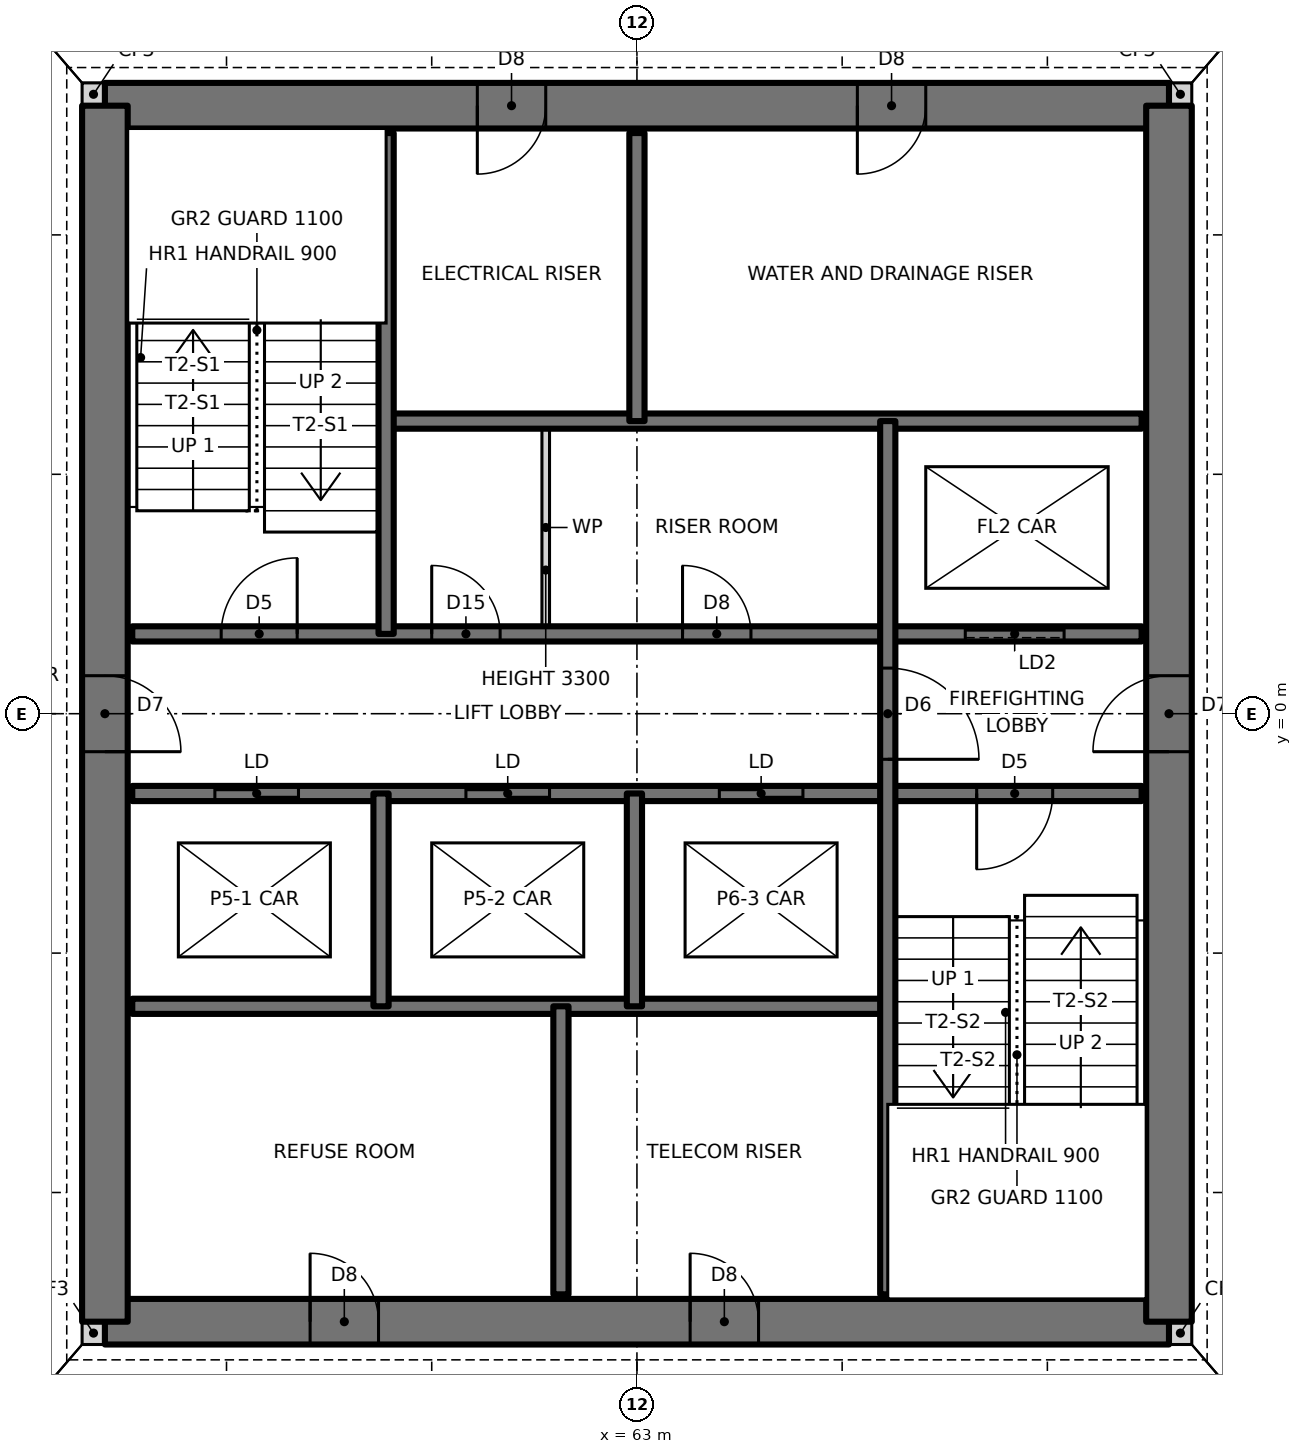
"""IFC4 building model, lengths in metres.
Left out: names, types, materials, properties, quantities, classifications, styles, units other than length and angle.
Written with IfcOpenShell. Run it as: python <this file> out.ifc"""

import sys

from ifc_helpers import new_model, si_unit, direction, frame, frame_2d, origin, place, context, subcontext, project, spatial, rectangle, extrude, element, fill, save


model = new_model("IFC4")
c1 = context("Model", 3, precision=1e-05, world=origin(), true_north=direction((0.0, 1.0)))
c2 = subcontext(c1, "Body", "Model", "MODEL_VIEW")
j1 = project(units=[si_unit("LENGTHUNIT", "METRE"), si_unit("PLANEANGLEUNIT", "RADIAN")], contexts=[c1])
p1 = place(None, origin())
s1 = spatial("IfcSite", under=j1, at=p1, CompositionType="ELEMENT")
p2 = place(p1, origin())
s2 = spatial("IfcBuilding", under=s1, at=p2, CompositionType="ELEMENT")
p3 = place(p2, frame((0.0, 0.0, 32.5)))
s3 = spatial("IfcBuildingStorey", under=s2, at=p3, CompositionType="ELEMENT", Elevation=32.5)
for number, where, z_axis, x_axis in (
    (1, (55.7, -8.15, 0.0), (0.0, 0.0, 1.0), (1.0, 0.0, 0.0)),
    (2, (70.0, -8.15, 0.0), (0.0, 0.0, 1.0), (1.0, 0.0, 0.0)),
    (3, (70.0, 8.15, 0.0), (0.0, 0.0, 1.0), (1.0, 0.0, 0.0)),
    (4, (55.7, 8.15, 0.0), (0.0, 0.0, 1.0), (1.0, 0.0, 0.0)),
):
    element("IfcWall", number, at=place(p3, frame(where, z_axis=z_axis, x_axis=x_axis)), inside=s3, PredefinedType="SOLIDWALL", context=c2, shape_type="SweptSolid", body=[
        extrude(rectangle(XDim=0.3, YDim=0.3, at=frame_2d((0.15, 0.0))), origin(), (0.0, 0.0, 1.0), 3.5),
    ])
p4 = place(p3, frame((56.0, -8.0, 0.0), z_axis=(0.0, 0.0, 1.0), x_axis=(1.0, 0.0, 0.0)))
e5 = element("IfcWall", 5, at=p4, inside=s3, PredefinedType="SHEAR", context=c2, shape_type="SweptSolid", body=[
    extrude(rectangle(XDim=14.0, YDim=0.6, at=frame_2d((7.0, 0.0))), origin(), (0.0, 0.0, 1.0), 3.5),
])
p5 = place(p4, frame((2.7, 0.0, 0.0)))
e6 = element("IfcOpeningElement", 6, at=p5, cuts=e5, PredefinedType="OPENING", context=c2, shape_type="SweptSolid", body=[
    extrude(rectangle(XDim=0.9, YDim=2.1, at=frame_2d((0.45, 1.05))), frame((0.0, 0.31, 0.0), z_axis=(0.0, -1.0, 0.0), x_axis=(1.0, 0.0, 0.0)), (0.0, 0.0, 1.0), 0.62),
])
p6 = place(p4, frame((7.7, 0.0, 0.0)))
e7 = element("IfcOpeningElement", 7, at=p6, cuts=e5, PredefinedType="OPENING", context=c2, shape_type="SweptSolid", body=[
    extrude(rectangle(XDim=0.9, YDim=2.1, at=frame_2d((0.45, 1.05))), frame((0.0, 0.31, 0.0), z_axis=(0.0, -1.0, 0.0), x_axis=(1.0, 0.0, 0.0)), (0.0, 0.0, 1.0), 0.62),
])
p7 = place(p3, frame((70.0, 8.0, 0.0), z_axis=(0.0, 0.0, 1.0), x_axis=(-1.0, 0.0, 0.0)))
e8 = element("IfcWall", 8, at=p7, inside=s3, PredefinedType="SHEAR", context=c2, shape_type="SweptSolid", body=[
    extrude(rectangle(XDim=14.0, YDim=0.6, at=frame_2d((7.0, 0.0))), origin(), (0.0, 0.0, 1.0), 3.5),
])
p8 = place(p7, frame((8.2, 0.0, 0.0)))
e9 = element("IfcOpeningElement", 9, at=p8, cuts=e8, PredefinedType="OPENING", context=c2, shape_type="SweptSolid", body=[
    extrude(rectangle(XDim=0.9, YDim=2.1, at=frame_2d((0.45, 1.05))), frame((0.0, 0.31, 0.0), z_axis=(0.0, -1.0, 0.0), x_axis=(1.0, 0.0, 0.0)), (0.0, 0.0, 1.0), 0.62),
])
p9 = place(p7, frame((3.2, 0.0, 0.0)))
e10 = element("IfcOpeningElement", 10, at=p9, cuts=e8, PredefinedType="OPENING", context=c2, shape_type="SweptSolid", body=[
    extrude(rectangle(XDim=0.9, YDim=2.1, at=frame_2d((0.45, 1.05))), frame((0.0, 0.31, 0.0), z_axis=(0.0, -1.0, 0.0), x_axis=(1.0, 0.0, 0.0)), (0.0, 0.0, 1.0), 0.62),
])
p10 = place(p3, frame((70.0, -8.0, 0.0), z_axis=(0.0, 0.0, 1.0), x_axis=(0.0, 1.0, 0.0)))
e11 = element("IfcWall", 11, at=p10, inside=s3, PredefinedType="SHEAR", context=c2, shape_type="SweptSolid", body=[
    extrude(rectangle(XDim=16.0, YDim=0.6, at=frame_2d((8.0, 0.0))), origin(), (0.0, 0.0, 1.0), 3.5),
])
p11 = place(p10, frame((7.5, 0.0, 0.0)))
e12 = element("IfcOpeningElement", 12, at=p11, cuts=e11, PredefinedType="OPENING", context=c2, shape_type="SweptSolid", body=[
    extrude(rectangle(XDim=1.0, YDim=2.1, at=frame_2d((0.5, 1.05))), frame((0.0, 0.31, 0.0), z_axis=(0.0, -1.0, 0.0), x_axis=(1.0, 0.0, 0.0)), (0.0, 0.0, 1.0), 0.62),
])
p12 = place(p3, frame((56.0, 8.0, 0.0), z_axis=(0.0, 0.0, 1.0), x_axis=(0.0, -1.0, 0.0)))
e13 = element("IfcWall", 13, at=p12, inside=s3, PredefinedType="SHEAR", context=c2, shape_type="SweptSolid", body=[
    extrude(rectangle(XDim=16.0, YDim=0.6, at=frame_2d((8.0, 0.0))), origin(), (0.0, 0.0, 1.0), 3.5),
])
p13 = place(p12, frame((7.5, 0.0, 0.0)))
e14 = element("IfcOpeningElement", 14, at=p13, cuts=e13, PredefinedType="OPENING", context=c2, shape_type="SweptSolid", body=[
    extrude(rectangle(XDim=1.0, YDim=2.1, at=frame_2d((0.5, 1.05))), frame((0.0, 0.31, 0.0), z_axis=(0.0, -1.0, 0.0), x_axis=(1.0, 0.0, 0.0)), (0.0, 0.0, 1.0), 0.62),
])
p14 = place(p3, frame((56.36, -3.85, 0.0), z_axis=(0.0, 0.0, 1.0), x_axis=(1.0, 0.0, 0.0)))
e15 = element("IfcWall", 15, at=p14, inside=s3, PredefinedType="SOLIDWALL", context=c2, shape_type="SweptSolid", body=[
    extrude(rectangle(XDim=9.94, YDim=0.2, at=frame_2d((4.97, 0.0))), origin(), (0.0, 0.0, 1.0), 3.5),
])
p15 = place(p3, frame((56.36, -1.05, 0.0), z_axis=(0.0, 0.0, 1.0), x_axis=(1.0, 0.0, 0.0)))
e16 = element("IfcWall", 16, at=p15, inside=s3, PredefinedType="SOLIDWALL", context=c2, shape_type="SweptSolid", body=[
    extrude(rectangle(XDim=13.28, YDim=0.2, at=frame_2d((6.64, 0.0))), origin(), (0.0, 0.0, 1.0), 3.5),
])
p16 = place(p15, frame((11.11, 0.0, 0.0)))
e17 = element("IfcOpeningElement", 17, at=p16, cuts=e16, PredefinedType="OPENING", context=c2, shape_type="SweptSolid", body=[
    extrude(rectangle(XDim=1.0, YDim=2.1, at=frame_2d((0.5, 1.05))), frame((0.0, 0.11, 0.0), z_axis=(0.0, -1.0, 0.0), x_axis=(1.0, 0.0, 0.0)), (0.0, 0.0, 1.0), 0.22),
])
p17 = place(p15, frame((1.087, 0.0, 0.0)))
e18 = element("IfcOpeningElement", 18, at=p17, cuts=e16, PredefinedType="OPENING", context=c2, shape_type="SweptSolid", body=[
    extrude(rectangle(XDim=1.1, YDim=2.1, at=frame_2d((0.55, 1.05))), frame((0.0, 0.11, 0.0), z_axis=(0.0, -1.0, 0.0), x_axis=(1.0, 0.0, 0.0)), (0.0, 0.0, 1.0), 0.22),
])
p18 = place(p15, frame((4.39, 0.0, 0.0)))
e19 = element("IfcOpeningElement", 19, at=p18, cuts=e16, PredefinedType="OPENING", context=c2, shape_type="SweptSolid", body=[
    extrude(rectangle(XDim=1.1, YDim=2.1, at=frame_2d((0.55, 1.05))), frame((0.0, 0.11, 0.0), z_axis=(0.0, -1.0, 0.0), x_axis=(1.0, 0.0, 0.0)), (0.0, 0.0, 1.0), 0.22),
])
p19 = place(p15, frame((7.724, 0.0, 0.0)))
e20 = element("IfcOpeningElement", 20, at=p19, cuts=e16, PredefinedType="OPENING", context=c2, shape_type="SweptSolid", body=[
    extrude(rectangle(XDim=1.1, YDim=2.1, at=frame_2d((0.55, 1.05))), frame((0.0, 0.11, 0.0), z_axis=(0.0, -1.0, 0.0), x_axis=(1.0, 0.0, 0.0)), (0.0, 0.0, 1.0), 0.22),
])
p20 = place(p3, frame((56.36, 1.05, 0.0), z_axis=(0.0, 0.0, 1.0), x_axis=(1.0, 0.0, 0.0)))
e21 = element("IfcWall", 21, at=p20, inside=s3, PredefinedType="SOLIDWALL", context=c2, shape_type="SweptSolid", body=[
    extrude(rectangle(XDim=13.28, YDim=0.2, at=frame_2d((6.64, 0.0))), origin(), (0.0, 0.0, 1.0), 3.5),
])
p21 = place(p20, frame((1.17, 0.0, 0.0)))
e22 = element("IfcOpeningElement", 22, at=p21, cuts=e21, PredefinedType="OPENING", context=c2, shape_type="SweptSolid", body=[
    extrude(rectangle(XDim=1.0, YDim=2.1, at=frame_2d((0.5, 1.05))), frame((0.0, 0.11, 0.0), z_axis=(0.0, -1.0, 0.0), x_axis=(1.0, 0.0, 0.0)), (0.0, 0.0, 1.0), 0.22),
])
p22 = place(p20, frame((7.24, 0.0, 0.0)))
e23 = element("IfcOpeningElement", 23, at=p22, cuts=e21, PredefinedType="OPENING", context=c2, shape_type="SweptSolid", body=[
    extrude(rectangle(XDim=0.9, YDim=2.1, at=frame_2d((0.45, 1.05))), frame((0.0, 0.11, 0.0), z_axis=(0.0, -1.0, 0.0), x_axis=(1.0, 0.0, 0.0)), (0.0, 0.0, 1.0), 0.22),
])
p23 = place(p20, frame((3.94, 0.0, 0.0)))
e24 = element("IfcOpeningElement", 24, at=p23, cuts=e21, PredefinedType="OPENING", context=c2, shape_type="SweptSolid", body=[
    extrude(rectangle(XDim=0.9, YDim=2.1, at=frame_2d((0.45, 1.05))), frame((0.0, 0.11, 0.0), z_axis=(0.0, -1.0, 0.0), x_axis=(1.0, 0.0, 0.0)), (0.0, 0.0, 1.0), 0.22),
])
p24 = place(p20, frame((10.96, 0.0, 0.0)))
e25 = element("IfcOpeningElement", 25, at=p24, cuts=e21, PredefinedType="OPENING", context=c2, shape_type="SweptSolid", body=[
    extrude(rectangle(XDim=1.3, YDim=2.1, at=frame_2d((0.65, 1.05))), frame((0.0, 0.11, 0.0), z_axis=(0.0, -1.0, 0.0), x_axis=(1.0, 0.0, 0.0)), (0.0, 0.0, 1.0), 0.22),
])
p25 = place(p3, frame((59.7, 3.85, 0.0), z_axis=(0.0, 0.0, 1.0), x_axis=(1.0, 0.0, 0.0)))
e26 = element("IfcWall", 26, at=p25, inside=s3, PredefinedType="SOLIDWALL", context=c2, shape_type="SweptSolid", body=[
    extrude(rectangle(XDim=9.94, YDim=0.2, at=frame_2d((4.97, 0.0))), origin(), (0.0, 0.0, 1.0), 3.5),
])
p26 = place(p3, frame((66.3, -7.64, 0.0), z_axis=(0.0, 0.0, 1.0), x_axis=(0.0, 1.0, 0.0)))
e27 = element("IfcWall", 27, at=p26, inside=s3, PredefinedType="SOLIDWALL", context=c2, shape_type="SweptSolid", body=[
    extrude(rectangle(XDim=11.49, YDim=0.2, at=frame_2d((5.745, 0.0))), origin(), (0.0, 0.0, 1.0), 3.5),
])
p27 = place(p26, frame((7.04, 0.0, 0.0)))
e28 = element("IfcOpeningElement", 28, at=p27, cuts=e27, PredefinedType="OPENING", context=c2, shape_type="SweptSolid", body=[
    extrude(rectangle(XDim=1.2, YDim=2.1, at=frame_2d((0.6, 1.05))), frame((0.0, 0.11, 0.0), z_axis=(0.0, -1.0, 0.0), x_axis=(1.0, 0.0, 0.0)), (0.0, 0.0, 1.0), 0.22),
])
p28 = place(p3, frame((63.0, 3.85, 0.0), z_axis=(0.0, 0.0, 1.0), x_axis=(0.0, 1.0, 0.0)))
e29 = element("IfcWall", 29, at=p28, inside=s3, PredefinedType="SOLIDWALL", context=c2, shape_type="SweptSolid", body=[
    extrude(rectangle(XDim=3.79, YDim=0.2, at=frame_2d((1.895, 0.0))), origin(), (0.0, 0.0, 1.0), 3.5),
])
p29 = place(p3, frame((62.967, -3.85, 0.0), z_axis=(0.0, 0.0, 1.0), x_axis=(0.0, 1.0, 0.0)))
e30 = element("IfcWall", 30, at=p29, inside=s3, PredefinedType="SOLIDWALL", context=c2, shape_type="SweptSolid", body=[
    extrude(rectangle(XDim=2.8, YDim=0.2, at=frame_2d((1.4, 0.0))), origin(), (0.0, 0.0, 1.0), 3.5),
])
p30 = place(p3, frame((62.0, -7.64, 0.0), z_axis=(0.0, 0.0, 1.0), x_axis=(0.0, 1.0, 0.0)))
e31 = element("IfcWall", 31, at=p30, inside=s3, PredefinedType="SOLIDWALL", context=c2, shape_type="SweptSolid", body=[
    extrude(rectangle(XDim=3.79, YDim=0.2, at=frame_2d((1.895, 0.0))), origin(), (0.0, 0.0, 1.0), 3.5),
])
p31 = place(p3, frame((61.8, 1.05, 0.0), z_axis=(0.0, 0.0, 1.0), x_axis=(0.0, 1.0, 0.0)))
e32 = element("IfcWall", 32, at=p31, inside=s3, PredefinedType="PARTITIONING", context=c2, shape_type="SweptSolid", body=[
    extrude(rectangle(XDim=2.8, YDim=0.1, at=frame_2d((1.4, 0.0))), origin(), (0.0, 0.0, 1.0), 3.3),
])
p32 = place(p3, frame((59.7, 1.05, 0.0), z_axis=(0.0, 0.0, 1.0), x_axis=(0.0, 1.0, 0.0)))
e33 = element("IfcWall", 33, at=p32, inside=s3, PredefinedType="SOLIDWALL", context=c2, shape_type="SweptSolid", body=[
    extrude(rectangle(XDim=6.59, YDim=0.2, at=frame_2d((3.295, 0.0))), origin(), (0.0, 0.0, 1.0), 3.5),
])
p33 = place(p3, frame((59.633, -3.85, 0.0), z_axis=(0.0, 0.0, 1.0), x_axis=(0.0, 1.0, 0.0)))
e34 = element("IfcWall", 34, at=p33, inside=s3, PredefinedType="SOLIDWALL", context=c2, shape_type="SweptSolid", body=[
    extrude(rectangle(XDim=2.8, YDim=0.2, at=frame_2d((1.4, 0.0))), origin(), (0.0, 0.0, 1.0), 3.5),
])
p34 = place(p21, origin())
e35 = element("IfcDoor", 35, at=p34, inside=s3, OperationType="SINGLE_SWING_RIGHT", PredefinedType="DOOR", context=c2, shape_type="SweptSolid", body=[
    extrude(rectangle(XDim=1.0, YDim=2.1, at=frame_2d((0.5, 1.05))), frame((0.0, 0.025, 0.0), z_axis=(0.0, -1.0, 0.0), x_axis=(1.0, 0.0, 0.0)), (0.0, 0.0, 1.0), 0.05),
])
fill(e22, e35)
p35 = place(p16, frame((1.0, 0.0, 0.0), z_axis=(0.0, 0.0, 1.0), x_axis=(-1.0, 0.0, 0.0)))
e36 = element("IfcDoor", 36, at=p35, inside=s3, OperationType="SINGLE_SWING_RIGHT", PredefinedType="DOOR", context=c2, shape_type="SweptSolid", body=[
    extrude(rectangle(XDim=1.0, YDim=2.1, at=frame_2d((0.5, 1.05))), frame((0.0, 0.025, 0.0), z_axis=(0.0, -1.0, 0.0), x_axis=(1.0, 0.0, 0.0)), (0.0, 0.0, 1.0), 0.05),
])
fill(e17, e36)
p36 = place(p27, frame((1.2, 0.0, 0.0), z_axis=(0.0, 0.0, 1.0), x_axis=(-1.0, 0.0, 0.0)))
e37 = element("IfcDoor", 37, at=p36, inside=s3, OperationType="SINGLE_SWING_RIGHT", PredefinedType="DOOR", context=c2, shape_type="SweptSolid", body=[
    extrude(rectangle(XDim=1.2, YDim=2.1, at=frame_2d((0.6, 1.05))), frame((0.0, 0.025, 0.0), z_axis=(0.0, -1.0, 0.0), x_axis=(1.0, 0.0, 0.0)), (0.0, 0.0, 1.0), 0.05),
])
fill(e28, e37)
p37 = place(p22, origin())
e38 = element("IfcDoor", 38, at=p37, inside=s3, OperationType="SINGLE_SWING_LEFT", PredefinedType="DOOR", context=c2, shape_type="SweptSolid", body=[
    extrude(rectangle(XDim=0.9, YDim=2.1, at=frame_2d((0.45, 1.05))), frame((0.0, 0.025, 0.0), z_axis=(0.0, -1.0, 0.0), x_axis=(1.0, 0.0, 0.0)), (0.0, 0.0, 1.0), 0.05),
])
fill(e23, e38)
p38 = place(p23, origin())
e39 = element("IfcDoor", 39, at=p38, inside=s3, OperationType="SINGLE_SWING_LEFT", PredefinedType="DOOR", context=c2, shape_type="SweptSolid", body=[
    extrude(rectangle(XDim=0.9, YDim=2.1, at=frame_2d((0.45, 1.05))), frame((0.0, 0.025, 0.0), z_axis=(0.0, -1.0, 0.0), x_axis=(1.0, 0.0, 0.0)), (0.0, 0.0, 1.0), 0.05),
])
fill(e24, e39)
p39 = place(p13, origin())
e40 = element("IfcDoor", 40, at=p39, inside=s3, OperationType="SINGLE_SWING_RIGHT", PredefinedType="DOOR", context=c2, shape_type="SweptSolid", body=[
    extrude(rectangle(XDim=1.0, YDim=2.1, at=frame_2d((0.5, 1.05))), frame((0.0, 0.025, 0.0), z_axis=(0.0, -1.0, 0.0), x_axis=(1.0, 0.0, 0.0)), (0.0, 0.0, 1.0), 0.05),
])
fill(e14, e40)
p40 = place(p11, origin())
e41 = element("IfcDoor", 41, at=p40, inside=s3, OperationType="SINGLE_SWING_LEFT", PredefinedType="DOOR", context=c2, shape_type="SweptSolid", body=[
    extrude(rectangle(XDim=1.0, YDim=2.1, at=frame_2d((0.5, 1.05))), frame((0.0, 0.025, 0.0), z_axis=(0.0, -1.0, 0.0), x_axis=(1.0, 0.0, 0.0)), (0.0, 0.0, 1.0), 0.05),
])
fill(e12, e41)
p41 = place(p8, origin())
e42 = element("IfcDoor", 42, at=p41, inside=s3, OperationType="SINGLE_SWING_RIGHT", PredefinedType="DOOR", context=c2, shape_type="SweptSolid", body=[
    extrude(rectangle(XDim=0.9, YDim=2.1, at=frame_2d((0.45, 1.05))), frame((0.0, 0.025, 0.0), z_axis=(0.0, -1.0, 0.0), x_axis=(1.0, 0.0, 0.0)), (0.0, 0.0, 1.0), 0.05),
])
fill(e9, e42)
p42 = place(p9, origin())
e43 = element("IfcDoor", 43, at=p42, inside=s3, OperationType="SINGLE_SWING_RIGHT", PredefinedType="DOOR", context=c2, shape_type="SweptSolid", body=[
    extrude(rectangle(XDim=0.9, YDim=2.1, at=frame_2d((0.45, 1.05))), frame((0.0, 0.025, 0.0), z_axis=(0.0, -1.0, 0.0), x_axis=(1.0, 0.0, 0.0)), (0.0, 0.0, 1.0), 0.05),
])
fill(e10, e43)
p43 = place(p5, origin())
e44 = element("IfcDoor", 44, at=p43, inside=s3, OperationType="SINGLE_SWING_LEFT", PredefinedType="DOOR", context=c2, shape_type="SweptSolid", body=[
    extrude(rectangle(XDim=0.9, YDim=2.1, at=frame_2d((0.45, 1.05))), frame((0.0, 0.025, 0.0), z_axis=(0.0, -1.0, 0.0), x_axis=(1.0, 0.0, 0.0)), (0.0, 0.0, 1.0), 0.05),
])
fill(e6, e44)
p44 = place(p6, origin())
e45 = element("IfcDoor", 45, at=p44, inside=s3, OperationType="SINGLE_SWING_LEFT", PredefinedType="DOOR", context=c2, shape_type="SweptSolid", body=[
    extrude(rectangle(XDim=0.9, YDim=2.1, at=frame_2d((0.45, 1.05))), frame((0.0, 0.025, 0.0), z_axis=(0.0, -1.0, 0.0), x_axis=(1.0, 0.0, 0.0)), (0.0, 0.0, 1.0), 0.05),
])
fill(e7, e45)
p45 = place(p17, origin())
e46 = element("IfcDoor", 46, at=p45, inside=s3, OperationType="DOUBLE_DOOR_SLIDING", PredefinedType="DOOR", context=c2, shape_type="SweptSolid", body=[
    extrude(rectangle(XDim=1.1, YDim=2.1, at=frame_2d((0.55, 1.05))), frame((0.0, 0.025, 0.0), z_axis=(0.0, -1.0, 0.0), x_axis=(1.0, 0.0, 0.0)), (0.0, 0.0, 1.0), 0.05),
])
fill(e18, e46)
p46 = place(p18, origin())
e47 = element("IfcDoor", 47, at=p46, inside=s3, OperationType="DOUBLE_DOOR_SLIDING", PredefinedType="DOOR", context=c2, shape_type="SweptSolid", body=[
    extrude(rectangle(XDim=1.1, YDim=2.1, at=frame_2d((0.55, 1.05))), frame((0.0, 0.025, 0.0), z_axis=(0.0, -1.0, 0.0), x_axis=(1.0, 0.0, 0.0)), (0.0, 0.0, 1.0), 0.05),
])
fill(e19, e47)
p47 = place(p19, origin())
e48 = element("IfcDoor", 48, at=p47, inside=s3, OperationType="DOUBLE_DOOR_SLIDING", PredefinedType="DOOR", context=c2, shape_type="SweptSolid", body=[
    extrude(rectangle(XDim=1.1, YDim=2.1, at=frame_2d((0.55, 1.05))), frame((0.0, 0.025, 0.0), z_axis=(0.0, -1.0, 0.0), x_axis=(1.0, 0.0, 0.0)), (0.0, 0.0, 1.0), 0.05),
])
fill(e20, e48)
p48 = place(p24, origin())
e49 = element("IfcDoor", 49, at=p48, inside=s3, OperationType="SLIDING_TO_LEFT", PredefinedType="DOOR", context=c2, shape_type="SweptSolid", body=[
    extrude(rectangle(XDim=1.3, YDim=2.1, at=frame_2d((0.65, 1.05))), frame((0.0, 0.025, 0.0), z_axis=(0.0, -1.0, 0.0), x_axis=(1.0, 0.0, 0.0)), (0.0, 0.0, 1.0), 0.05),
])
fill(e25, e49)
save(model, sys.argv[1])
